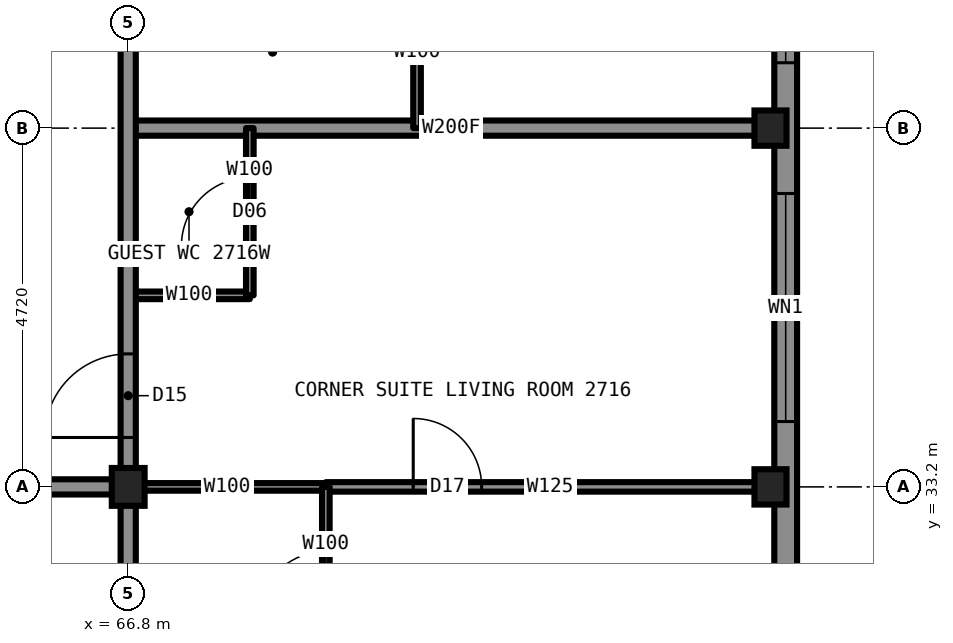
"""IFC4 building model, lengths in metres.
Left out: names, types, materials, properties, quantities, classifications, styles, units other than length and angle.
Written with IfcOpenShell. Run it as: python <this file> out.ifc"""

import sys

from ifc_helpers import new_model, si_unit, direction, frame, frame_2d, origin, origin_2d, place, context, subcontext, project, spatial, rectangle, i_section, extrude, element, fill, save


model = new_model("IFC4")
c1 = context("Model", 3, precision=1e-05, world=origin(), true_north=direction((0.0, 1.0)))
c2 = subcontext(c1, "Body", "Model", "MODEL_VIEW")
j1 = project(units=[si_unit("LENGTHUNIT", "METRE"), si_unit("PLANEANGLEUNIT", "RADIAN")], contexts=[c1])
p1 = place(None, origin())
s1 = spatial("IfcSite", under=j1, at=p1, CompositionType="ELEMENT")
p2 = place(p1, origin())
s2 = spatial("IfcBuilding", under=s1, at=p2, CompositionType="ELEMENT")
p3 = place(p2, frame((0.0, 0.0, 103.9)))
s3 = spatial("IfcBuildingStorey", under=s2, at=p3, CompositionType="ELEMENT", Elevation=103.9)
for number, where, z_axis, x_axis in (
    (1, (75.25, 33.2, 0.0), (0.0, 0.0, 1.0), (1.0, 0.0, 0.0)),
    (2, (75.25, 37.92, 0.0), (0.0, 0.0, 1.0), (1.0, 0.0, 0.0)),
):
    element("IfcColumn", number, at=place(p3, frame(where, z_axis=z_axis, x_axis=x_axis)), inside=s3, PredefinedType="COLUMN", context=c2, shape_type="SweptSolid", body=[
        extrude(i_section(OverallWidth=0.422, OverallDepth=0.465, WebThickness=0.045, FlangeThickness=0.073, at=origin_2d()), origin(), (0.0, 0.0, 1.0), 3.5),
    ])
p4 = place(p3, frame((66.8, 33.2, 0.0), z_axis=(0.0, 0.0, 1.0), x_axis=(1.0, 0.0, 0.0)))
e3 = element("IfcColumn", 3, at=p4, inside=s3, PredefinedType="COLUMN", context=c2, shape_type="SweptSolid", body=[
    extrude(i_section(OverallWidth=0.432, OverallDepth=0.498, WebThickness=0.056, FlangeThickness=0.089, at=origin_2d()), origin(), (0.0, 0.0, 1.0), 3.5),
])
p5 = place(p3, frame((66.8, 33.2, 0.0), z_axis=(0.0, 0.0, 1.0), x_axis=(1.0, 0.0, 0.0)))
e4 = element("IfcWall", 4, at=p5, inside=s3, PredefinedType="PARTITIONING", context=c2, shape_type="SweptSolid", body=[
    extrude(rectangle(XDim=2.6, YDim=0.1, at=frame_2d((1.3, 0.0))), origin(), (0.0, 0.0, 1.0), 2.573),
])
p6 = place(p3, frame((43.2, 33.2, 0.0), z_axis=(0.0, 0.0, 1.0), x_axis=(1.0, 0.0, 0.0)))
e5 = element("IfcWall", 5, at=p6, inside=s3, PredefinedType="PARTITIONING", context=c2, shape_type="SweptSolid", body=[
    extrude(rectangle(XDim=23.6, YDim=0.2, at=frame_2d((11.8, 0.0))), origin(), (0.0, 0.0, 1.0), 3.33),
])
p7 = place(p6, frame((3.0, 0.0, 0.0)))
e6 = element("IfcOpeningElement", 6, at=p7, cuts=e5, PredefinedType="OPENING", context=c2, shape_type="SweptSolid", body=[
    extrude(rectangle(XDim=1.0, YDim=2.2, at=frame_2d((0.5, 1.1))), frame((0.0, 0.11, 0.0), z_axis=(0.0, -1.0, 0.0), x_axis=(1.0, 0.0, 0.0)), (0.0, 0.0, 1.0), 0.22),
])
p8 = place(p6, frame((12.44, 0.0, 0.0)))
e7 = element("IfcOpeningElement", 7, at=p8, cuts=e5, PredefinedType="OPENING", context=c2, shape_type="SweptSolid", body=[
    extrude(rectangle(XDim=1.0, YDim=2.2, at=frame_2d((0.5, 1.1))), frame((0.0, 0.11, 0.0), z_axis=(0.0, -1.0, 0.0), x_axis=(1.0, 0.0, 0.0)), (0.0, 0.0, 1.0), 0.22),
])
p9 = place(p6, frame((21.43, 0.0, 0.0)))
e8 = element("IfcOpeningElement", 8, at=p9, cuts=e5, PredefinedType="OPENING", context=c2, shape_type="SweptSolid", body=[
    extrude(rectangle(XDim=1.0, YDim=2.2, at=frame_2d((0.5, 1.1))), frame((0.0, 0.11, 0.0), z_axis=(0.0, -1.0, 0.0), x_axis=(1.0, 0.0, 0.0)), (0.0, 0.0, 1.0), 0.22),
])
p10 = place(p3, frame((69.4, 33.2, 0.0), z_axis=(0.0, 0.0, 1.0), x_axis=(1.0, 0.0, 0.0)))
e9 = element("IfcWall", 9, at=p10, inside=s3, PredefinedType="PARTITIONING", context=c2, shape_type="SweptSolid", body=[
    extrude(rectangle(XDim=5.9, YDim=0.125, at=frame_2d((2.95, 0.0))), origin(), (0.0, 0.0, 1.0), 2.573),
])
p11 = place(p10, frame((1.15, 0.0, 0.0)))
e10 = element("IfcOpeningElement", 10, at=p11, cuts=e9, PredefinedType="OPENING", context=c2, shape_type="SweptSolid", body=[
    extrude(rectangle(XDim=0.9, YDim=2.2, at=frame_2d((0.45, 1.1))), frame((0.0, 0.073, 0.0), z_axis=(0.0, -1.0, 0.0), x_axis=(1.0, 0.0, 0.0)), (0.0, 0.0, 1.0), 0.145),
])
p12 = place(p3, frame((66.8, 37.92, 0.0), z_axis=(0.0, 0.0, 1.0), x_axis=(1.0, 0.0, 0.0)))
e11 = element("IfcWall", 11, at=p12, inside=s3, PredefinedType="PARTITIONING", context=c2, shape_type="SweptSolid", body=[
    extrude(rectangle(XDim=8.5, YDim=0.2, at=frame_2d((4.25, 0.0))), origin(), (0.0, 0.0, 1.0), 2.573),
])
p13 = place(p3, frame((66.8, 35.72, 0.0), z_axis=(0.0, 0.0, 1.0), x_axis=(1.0, 0.0, 0.0)))
e12 = element("IfcWall", 12, at=p13, inside=s3, PredefinedType="PARTITIONING", context=c2, shape_type="SweptSolid", body=[
    extrude(rectangle(XDim=1.6, YDim=0.1, at=frame_2d((0.8, 0.0))), origin(), (0.0, 0.0, 1.0), 3.33),
])
p14 = place(p3, frame((66.8, 33.2, 0.0), z_axis=(0.0, 0.0, 1.0), x_axis=(0.0, 1.0, 0.0)))
e13 = element("IfcWall", 13, at=p14, inside=s3, PredefinedType="PARTITIONING", context=c2, shape_type="SweptSolid", body=[
    extrude(rectangle(XDim=23.58, YDim=0.2, at=frame_2d((11.79, 0.0))), origin(), (0.0, 0.0, 1.0), 3.33),
])
p15 = place(p14, frame((6.98, 0.0, 0.0)))
e14 = element("IfcOpeningElement", 14, at=p15, cuts=e13, PredefinedType="OPENING", context=c2, shape_type="SweptSolid", body=[
    extrude(rectangle(XDim=1.0, YDim=2.2, at=frame_2d((0.5, 1.1))), frame((0.0, 0.11, 0.0), z_axis=(0.0, -1.0, 0.0), x_axis=(1.0, 0.0, 0.0)), (0.0, 0.0, 1.0), 0.22),
])
p16 = place(p14, frame((12.59, 0.0, 0.0)))
e15 = element("IfcOpeningElement", 15, at=p16, cuts=e13, PredefinedType="OPENING", context=c2, shape_type="SweptSolid", body=[
    extrude(rectangle(XDim=1.0, YDim=2.2, at=frame_2d((0.5, 1.1))), frame((0.0, 0.11, 0.0), z_axis=(0.0, -1.0, 0.0), x_axis=(1.0, 0.0, 0.0)), (0.0, 0.0, 1.0), 0.22),
])
p17 = place(p14, frame((16.42, 0.0, 0.0)))
e16 = element("IfcOpeningElement", 16, at=p17, cuts=e13, PredefinedType="OPENING", context=c2, shape_type="SweptSolid", body=[
    extrude(rectangle(XDim=1.0, YDim=2.2, at=frame_2d((0.5, 1.1))), frame((0.0, 0.11, 0.0), z_axis=(0.0, -1.0, 0.0), x_axis=(1.0, 0.0, 0.0)), (0.0, 0.0, 1.0), 0.22),
])
p18 = place(p14, frame((21.85, 0.0, 0.0)))
e17 = element("IfcOpeningElement", 17, at=p18, cuts=e13, PredefinedType="OPENING", context=c2, shape_type="SweptSolid", body=[
    extrude(rectangle(XDim=1.1, YDim=2.2, at=frame_2d((0.55, 1.1))), frame((0.0, 0.11, 0.0), z_axis=(0.0, -1.0, 0.0), x_axis=(1.0, 0.0, 0.0)), (0.0, 0.0, 1.0), 0.22),
])
p19 = place(p14, frame((0.65, 0.0, 0.0)))
e18 = element("IfcOpeningElement", 18, at=p19, cuts=e13, PredefinedType="OPENING", context=c2, shape_type="SweptSolid", body=[
    extrude(rectangle(XDim=1.1, YDim=2.2, at=frame_2d((0.55, 1.1))), frame((0.0, 0.11, 0.0), z_axis=(0.0, -1.0, 0.0), x_axis=(1.0, 0.0, 0.0)), (0.0, 0.0, 1.0), 0.22),
])
p20 = place(p3, frame((66.8, 24.7, 0.0), z_axis=(0.0, 0.0, 1.0), x_axis=(0.0, 1.0, 0.0)))
e19 = element("IfcWall", 19, at=p20, inside=s3, PredefinedType="PARTITIONING", context=c2, shape_type="SweptSolid", body=[
    extrude(rectangle(XDim=8.5, YDim=0.2, at=frame_2d((4.25, 0.0))), origin(), (0.0, 0.0, 1.0), 2.573),
])
p21 = place(p3, frame((68.4, 35.72, 0.0), z_axis=(0.0, 0.0, 1.0), x_axis=(0.0, 1.0, 0.0)))
e20 = element("IfcWall", 20, at=p21, inside=s3, PredefinedType="PARTITIONING", context=c2, shape_type="SweptSolid", body=[
    extrude(rectangle(XDim=2.2, YDim=0.1, at=frame_2d((1.1, 0.0))), origin(), (0.0, 0.0, 1.0), 3.33),
])
p22 = place(p21, frame((0.65, 0.0, 0.0)))
e21 = element("IfcOpeningElement", 21, at=p22, cuts=e20, PredefinedType="OPENING", context=c2, shape_type="SweptSolid", body=[
    extrude(rectangle(XDim=0.9, YDim=2.1, at=frame_2d((0.45, 1.05))), frame((0.0, 0.06, 0.0), z_axis=(0.0, -1.0, 0.0), x_axis=(1.0, 0.0, 0.0)), (0.0, 0.0, 1.0), 0.12),
])
p23 = place(p3, frame((69.4, 30.6, 0.0), z_axis=(0.0, 0.0, 1.0), x_axis=(0.0, 1.0, 0.0)))
e22 = element("IfcWall", 22, at=p23, inside=s3, PredefinedType="PARTITIONING", context=c2, shape_type="SweptSolid", body=[
    extrude(rectangle(XDim=2.6, YDim=0.1, at=frame_2d((1.3, 0.0))), origin(), (0.0, 0.0, 1.0), 3.33),
])
p24 = place(p23, frame((0.85, 0.0, 0.0)))
e23 = element("IfcOpeningElement", 23, at=p24, cuts=e22, PredefinedType="OPENING", context=c2, shape_type="SweptSolid", body=[
    extrude(rectangle(XDim=0.9, YDim=2.1, at=frame_2d((0.45, 1.05))), frame((0.0, 0.06, 0.0), z_axis=(0.0, -1.0, 0.0), x_axis=(1.0, 0.0, 0.0)), (0.0, 0.0, 1.0), 0.12),
])
p25 = place(p3, frame((70.6, 37.92, 0.0), z_axis=(0.0, 0.0, 1.0), x_axis=(0.0, 1.0, 0.0)))
e24 = element("IfcWall", 24, at=p25, inside=s3, PredefinedType="PARTITIONING", context=c2, shape_type="SweptSolid", body=[
    extrude(rectangle(XDim=2.0, YDim=0.1, at=frame_2d((1.0, 0.0))), origin(), (0.0, 0.0, 1.0), 3.33),
])
p26 = place(p3, frame((75.45, 29.9, 0.0), z_axis=(0.0, 0.0, 1.0), x_axis=(0.0, 1.0, 0.0)))
e25 = element("IfcWall", 25, at=p26, inside=s3, PredefinedType="SOLIDWALL", context=c2, shape_type="SweptSolid", body=[
    extrude(rectangle(XDim=30.2, YDim=0.3, at=frame_2d((15.1, 0.0))), origin(), (0.0, 0.0, 1.0), 2.83),
])
p27 = place(p26, frame((4.16, 0.0, 0.5)))
e26 = element("IfcOpeningElement", 26, at=p27, cuts=e25, PredefinedType="OPENING", context=c2, shape_type="SweptSolid", body=[
    extrude(rectangle(XDim=3.0, YDim=2.0, at=frame_2d((1.5, 1.0))), frame((0.0, 0.16, 0.0), z_axis=(0.0, -1.0, 0.0), x_axis=(1.0, 0.0, 0.0)), (0.0, 0.0, 1.0), 0.32),
])
p28 = place(p26, frame((8.88, 0.0, 0.5)))
e27 = element("IfcOpeningElement", 27, at=p28, cuts=e25, PredefinedType="OPENING", context=c2, shape_type="SweptSolid", body=[
    extrude(rectangle(XDim=3.0, YDim=2.0, at=frame_2d((1.5, 1.0))), frame((0.0, 0.16, 0.0), z_axis=(0.0, -1.0, 0.0), x_axis=(1.0, 0.0, 0.0)), (0.0, 0.0, 1.0), 0.32),
])
p29 = place(p26, frame((13.6, 0.0, 0.5)))
e28 = element("IfcOpeningElement", 28, at=p29, cuts=e25, PredefinedType="OPENING", context=c2, shape_type="SweptSolid", body=[
    extrude(rectangle(XDim=3.0, YDim=2.0, at=frame_2d((1.5, 1.0))), frame((0.0, 0.16, 0.0), z_axis=(0.0, -1.0, 0.0), x_axis=(1.0, 0.0, 0.0)), (0.0, 0.0, 1.0), 0.32),
])
p30 = place(p26, frame((18.32, 0.0, 0.5)))
e29 = element("IfcOpeningElement", 29, at=p30, cuts=e25, PredefinedType="OPENING", context=c2, shape_type="SweptSolid", body=[
    extrude(rectangle(XDim=3.0, YDim=2.0, at=frame_2d((1.5, 1.0))), frame((0.0, 0.16, 0.0), z_axis=(0.0, -1.0, 0.0), x_axis=(1.0, 0.0, 0.0)), (0.0, 0.0, 1.0), 0.32),
])
p31 = place(p26, frame((23.04, 0.0, 0.5)))
e30 = element("IfcOpeningElement", 30, at=p31, cuts=e25, PredefinedType="OPENING", context=c2, shape_type="SweptSolid", body=[
    extrude(rectangle(XDim=3.0, YDim=2.0, at=frame_2d((1.5, 1.0))), frame((0.0, 0.16, 0.0), z_axis=(0.0, -1.0, 0.0), x_axis=(1.0, 0.0, 0.0)), (0.0, 0.0, 1.0), 0.32),
])
p32 = place(p19, origin())
e31 = element("IfcDoor", 31, at=p32, inside=s3, OperationType="SINGLE_SWING_LEFT", PredefinedType="DOOR", context=c2, shape_type="SweptSolid", body=[
    extrude(rectangle(XDim=1.1, YDim=2.2, at=frame_2d((0.55, 1.1))), frame((0.0, 0.025, 0.0), z_axis=(0.0, -1.0, 0.0), x_axis=(1.0, 0.0, 0.0)), (0.0, 0.0, 1.0), 0.05),
])
fill(e18, e31)
p33 = place(p24, origin())
e32 = element("IfcDoor", 32, at=p33, inside=s3, OperationType="SINGLE_SWING_RIGHT", PredefinedType="DOOR", context=c2, shape_type="SweptSolid", body=[
    extrude(rectangle(XDim=0.9, YDim=2.1, at=frame_2d((0.45, 1.05))), frame((0.0, 0.025, 0.0), z_axis=(0.0, -1.0, 0.0), x_axis=(1.0, 0.0, 0.0)), (0.0, 0.0, 1.0), 0.05),
])
fill(e23, e32)
p34 = place(p11, origin())
e33 = element("IfcDoor", 33, at=p34, inside=s3, OperationType="SINGLE_SWING_LEFT", PredefinedType="DOOR", context=c2, shape_type="SweptSolid", body=[
    extrude(rectangle(XDim=0.9, YDim=2.2, at=frame_2d((0.45, 1.1))), frame((0.0, 0.025, 0.0), z_axis=(0.0, -1.0, 0.0), x_axis=(1.0, 0.0, 0.0)), (0.0, 0.0, 1.0), 0.05),
])
fill(e10, e33)
p35 = place(p22, origin())
e34 = element("IfcDoor", 34, at=p35, inside=s3, OperationType="SINGLE_SWING_LEFT", PredefinedType="DOOR", context=c2, shape_type="SweptSolid", body=[
    extrude(rectangle(XDim=0.9, YDim=2.1, at=frame_2d((0.45, 1.05))), frame((0.0, 0.025, 0.0), z_axis=(0.0, -1.0, 0.0), x_axis=(1.0, 0.0, 0.0)), (0.0, 0.0, 1.0), 0.05),
])
fill(e21, e34)
p36 = place(p27, origin())
e35 = element("IfcWindow", 35, at=p36, inside=s3, PartitioningType="SINGLE_PANEL", PredefinedType="WINDOW", context=c2, shape_type="SweptSolid", body=[
    extrude(rectangle(XDim=3.0, YDim=2.0, at=frame_2d((1.5, 1.0))), frame((0.0, 0.03, 0.0), z_axis=(0.0, -1.0, 0.0), x_axis=(1.0, 0.0, 0.0)), (0.0, 0.0, 1.0), 0.06),
])
fill(e26, e35)
p37 = place(p28, origin())
e36 = element("IfcWindow", 36, at=p37, inside=s3, PartitioningType="SINGLE_PANEL", PredefinedType="WINDOW", context=c2, shape_type="SweptSolid", body=[
    extrude(rectangle(XDim=3.0, YDim=2.0, at=frame_2d((1.5, 1.0))), frame((0.0, 0.03, 0.0), z_axis=(0.0, -1.0, 0.0), x_axis=(1.0, 0.0, 0.0)), (0.0, 0.0, 1.0), 0.06),
])
fill(e27, e36)
save(model, sys.argv[1])
